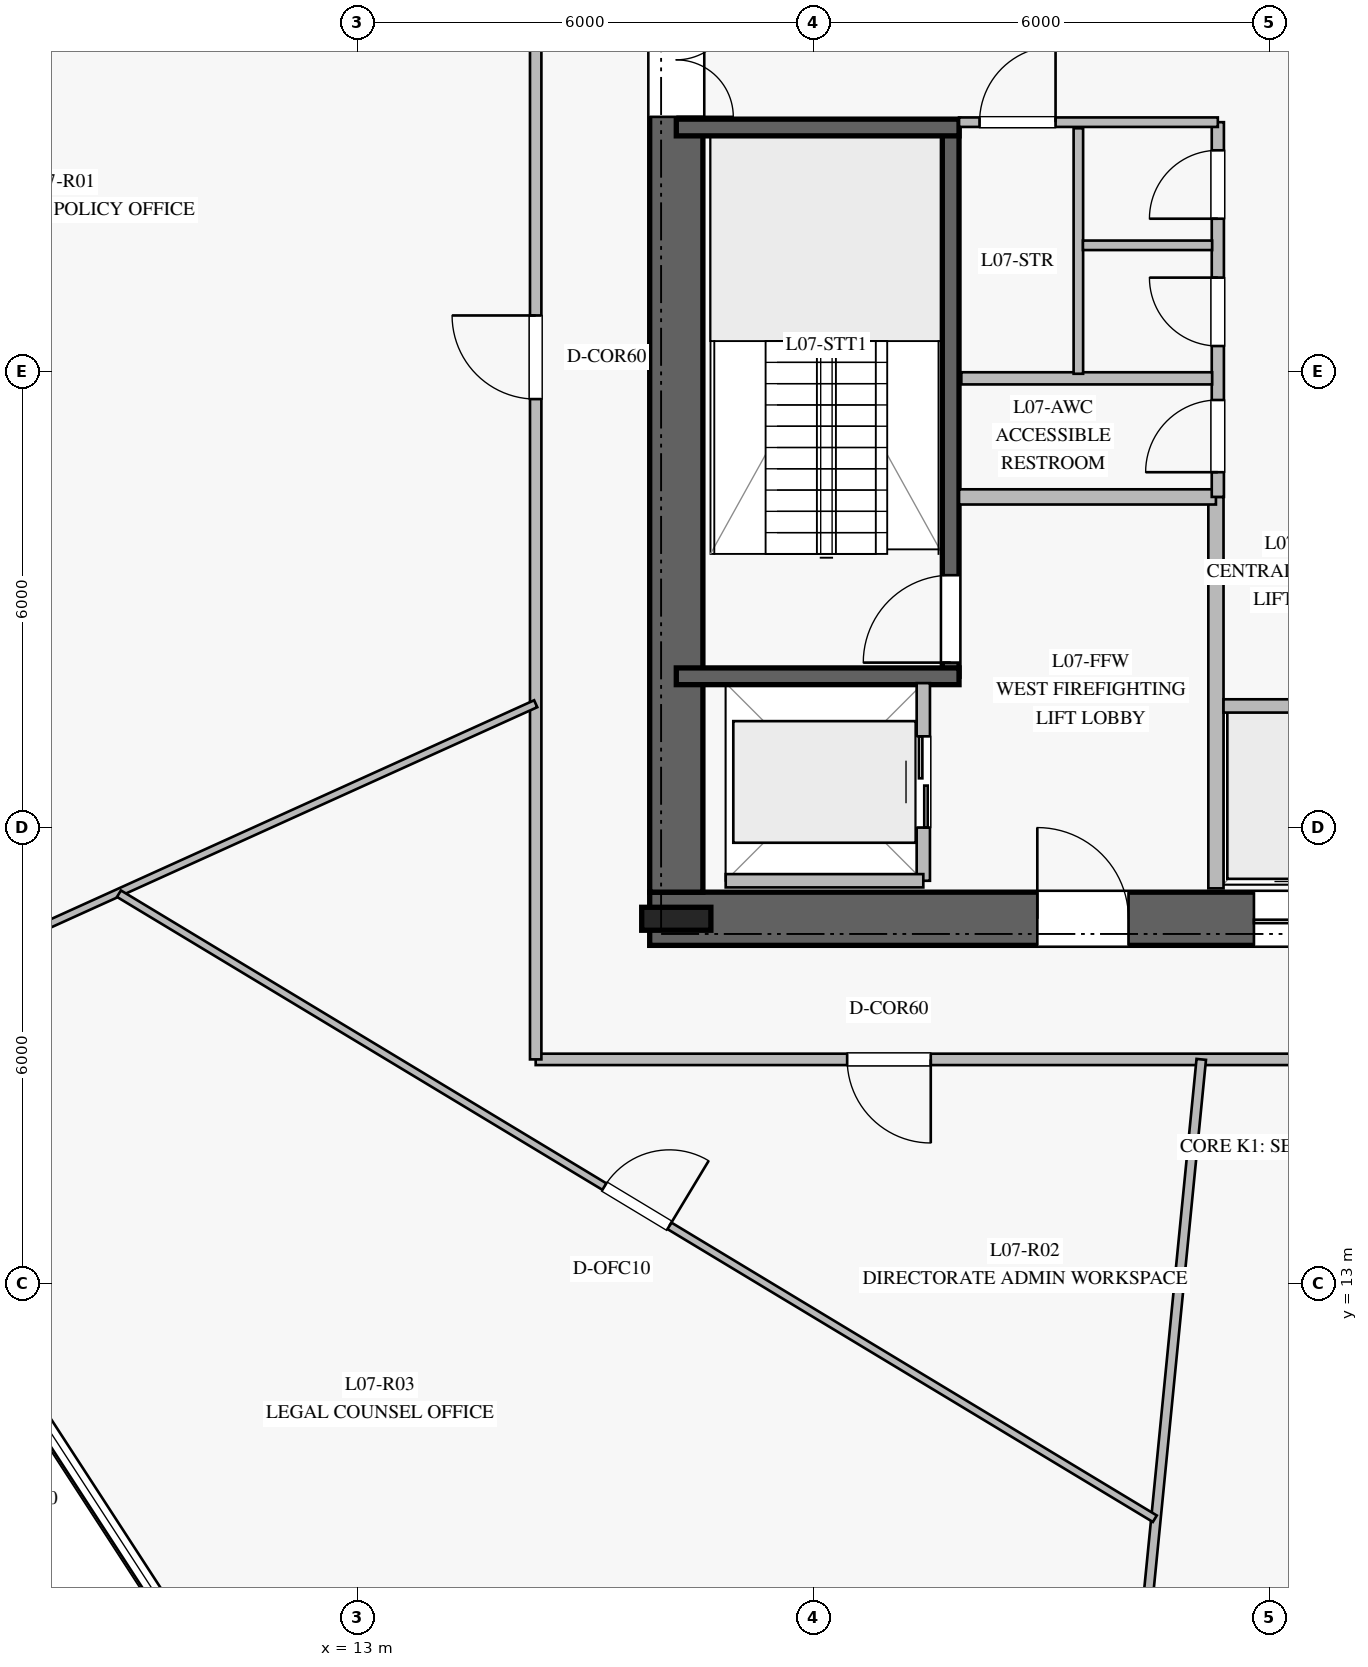
"""IFC4 building model, lengths in metres.
Left out: names, types, materials, properties, quantities, classifications, styles, units other than length and angle.
Written with IfcOpenShell. Run it as: python <this file> out.ifc"""

import sys

from ifc_helpers import new_model, si_unit, direction, frame, frame_2d, origin, origin_2d, place, context, subcontext, project, spatial, rectangle, i_section, extrude, element, fill, save


model = new_model("IFC4")
c1 = context("Model", 3, precision=1e-05, world=origin(), true_north=direction((0.0, 1.0)))
c2 = subcontext(c1, "Body", "Model", "MODEL_VIEW")
j1 = project(units=[si_unit("LENGTHUNIT", "METRE"), si_unit("PLANEANGLEUNIT", "RADIAN")], contexts=[c1])
p1 = place(None, origin())
s1 = spatial("IfcSite", under=j1, at=p1, CompositionType="ELEMENT")
p2 = place(p1, origin())
s2 = spatial("IfcBuilding", under=s1, at=p2, CompositionType="ELEMENT")
p3 = place(p2, frame((0.0, 0.0, 32.0)))
s3 = spatial("IfcBuildingStorey", under=s2, at=p3, CompositionType="ELEMENT", Elevation=32.0)
p4 = place(p3, frame((16.85, 17.8, 0.0), z_axis=(0.0, 0.0, 1.0), x_axis=(1.0, 0.0, 0.0)))
e1 = element("IfcWall", 1, at=p4, inside=s3, PredefinedType="SHEAR", context=c2, shape_type="SweptSolid", body=[
    extrude(rectangle(XDim=16.3, YDim=0.7, at=frame_2d((8.15, 0.0))), origin(), (0.0, 0.0, 1.0), 3.76),
])
p5 = place(p4, frame((5.1, 0.0, 0.0)))
e2 = element("IfcOpeningElement", 2, at=p5, cuts=e1, PredefinedType="OPENING", context=c2, shape_type="SweptSolid", body=[
    extrude(rectangle(XDim=1.2, YDim=2.25, at=frame_2d((0.6, 1.125))), frame((0.0, 0.36, 0.0), z_axis=(0.0, -1.0, 0.0), x_axis=(1.0, 0.0, 0.0)), (0.0, 0.0, 1.0), 0.72),
])
p6 = place(p4, frame((14.05, 0.0, 0.0)))
e3 = element("IfcOpeningElement", 3, at=p6, cuts=e1, PredefinedType="OPENING", context=c2, shape_type="SweptSolid", body=[
    extrude(rectangle(XDim=0.9, YDim=2.1, at=frame_2d((0.45, 1.05))), frame((0.0, 0.36, 0.0), z_axis=(0.0, -1.0, 0.0), x_axis=(1.0, 0.0, 0.0)), (0.0, 0.0, 1.0), 0.72),
])
p7 = place(p4, frame((7.95, 0.0, 0.0)))
e4 = element("IfcOpeningElement", 4, at=p7, cuts=e1, PredefinedType="OPENING", context=c2, shape_type="SweptSolid", body=[
    extrude(rectangle(XDim=1.1, YDim=2.2, at=frame_2d((0.55, 1.1))), frame((0.0, 0.36, 0.0), z_axis=(0.0, -1.0, 0.0), x_axis=(1.0, 0.0, 0.0)), (0.0, 0.0, 1.0), 0.72),
])
p8 = place(p4, frame((9.925, 0.0, 0.0)))
e5 = element("IfcOpeningElement", 5, at=p8, cuts=e1, PredefinedType="OPENING", context=c2, shape_type="SweptSolid", body=[
    extrude(rectangle(XDim=1.1, YDim=2.2, at=frame_2d((0.55, 1.1))), frame((0.0, 0.36, 0.0), z_axis=(0.0, -1.0, 0.0), x_axis=(1.0, 0.0, 0.0)), (0.0, 0.0, 1.0), 0.72),
])
p9 = place(p4, frame((11.9, 0.0, 0.0)))
e6 = element("IfcOpeningElement", 6, at=p9, cuts=e1, PredefinedType="OPENING", context=c2, shape_type="SweptSolid", body=[
    extrude(rectangle(XDim=1.1, YDim=2.2, at=frame_2d((0.55, 1.1))), frame((0.0, 0.36, 0.0), z_axis=(0.0, -1.0, 0.0), x_axis=(1.0, 0.0, 0.0)), (0.0, 0.0, 1.0), 0.72),
])
p10 = place(p3, frame((17.2, 31.85, 0.0), z_axis=(0.0, 0.0, 1.0), x_axis=(0.0, -1.0, 0.0)))
e7 = element("IfcWall", 7, at=p10, inside=s3, PredefinedType="SHEAR", context=c2, shape_type="SweptSolid", body=[
    extrude(rectangle(XDim=13.7, YDim=0.7, at=frame_2d((6.85, 0.0))), origin(), (0.0, 0.0, 1.0), 3.76),
])
p11 = place(p10, frame((2.0, 0.0, 0.0)))
e8 = element("IfcOpeningElement", 8, at=p11, cuts=e7, PredefinedType="OPENING", context=c2, shape_type="SweptSolid", body=[
    extrude(rectangle(XDim=1.5, YDim=2.2, at=frame_2d((0.75, 1.1))), frame((0.0, 0.36, 0.0), z_axis=(0.0, -1.0, 0.0), x_axis=(1.0, 0.0, 0.0)), (0.0, 0.0, 1.0), 0.72),
])
p12 = place(p3, frame((17.2, 17.8, 0.0), z_axis=(0.0, 0.0, 1.0), x_axis=(1.0, 0.0, 0.0)))
e9 = element("IfcColumn", 9, at=p12, inside=s3, PredefinedType="COLUMN", context=c2, shape_type="SweptSolid", body=[
    extrude(i_section(OverallWidth=0.302, OverallDepth=0.91, WebThickness=0.021, FlangeThickness=0.04, at=origin_2d()), origin(), (0.0, 0.0, 1.0), 4.0),
])
p13 = place(p3, frame((20.81, 20.99, 0.0), z_axis=(0.0, 0.0, 1.0), x_axis=(0.0, 1.0, 0.0)))
e10 = element("IfcWall", 10, at=p13, inside=s3, PredefinedType="SOLIDWALL", context=c2, shape_type="SweptSolid", body=[
    extrude(rectangle(XDim=7.22, YDim=0.22, at=frame_2d((3.61, 0.0))), origin(), (0.0, 0.0, 1.0), 3.76),
])
p14 = place(p13, frame((0.18, 0.0, 0.0)))
e11 = element("IfcOpeningElement", 11, at=p14, cuts=e10, PredefinedType="OPENING", context=c2, shape_type="SweptSolid", body=[
    extrude(rectangle(XDim=1.15, YDim=2.2, at=frame_2d((0.575, 1.1))), frame((0.0, 0.12, 0.0), z_axis=(0.0, -1.0, 0.0), x_axis=(1.0, 0.0, 0.0)), (0.0, 0.0, 1.0), 0.24),
])
for number, where, z_axis, x_axis in (
    (12, (17.2, 20.99, 0.0), (0.0, 0.0, 1.0), (1.0, 0.0, 0.0)),
    (13, (17.2, 28.21, 0.0), (0.0, 0.0, 1.0), (1.0, 0.0, 0.0)),
):
    element("IfcWall", number, at=place(p3, frame(where, z_axis=z_axis, x_axis=x_axis)), inside=s3, PredefinedType="SOLIDWALL", context=c2, shape_type="SweptSolid", body=[
        extrude(rectangle(XDim=3.72, YDim=0.22, at=frame_2d((1.86, 0.0))), origin(), (0.0, 0.0, 1.0), 3.76),
    ])
p15 = place(p3, frame((24.3, 18.2, 0.0), z_axis=(0.0, 0.0, 1.0), x_axis=(0.0, 1.0, 0.0)))
e14 = element("IfcWall", 14, at=p15, inside=s3, PredefinedType="PARTITIONING", context=c2, shape_type="SweptSolid", body=[
    extrude(rectangle(XDim=5.15, YDim=0.2, at=frame_2d((2.575, 0.0))), origin(), (0.0, 0.0, 1.0), 3.76),
])
p16 = place(p3, frame((20.92, 23.35, 0.0), z_axis=(0.0, 0.0, 1.0), x_axis=(1.0, 0.0, 0.0)))
e15 = element("IfcWall", 15, at=p16, inside=s3, PredefinedType="PARTITIONING", context=c2, shape_type="SweptSolid", body=[
    extrude(rectangle(XDim=3.38, YDim=0.2, at=frame_2d((1.69, 0.0))), origin(), (0.0, 0.0, 1.0), 3.76),
])
p17 = place(p3, frame((24.325, 23.35, 0.0), z_axis=(0.0, 0.0, 1.0), x_axis=(0.0, 1.0, 0.0)))
e16 = element("IfcWall", 16, at=p17, inside=s3, PredefinedType="PLUMBINGWALL", context=c2, shape_type="SweptSolid", body=[
    extrude(rectangle(XDim=4.93, YDim=0.16, at=frame_2d((2.465, 0.0))), origin(), (0.0, 0.0, 1.0), 3.76),
])
p18 = place(p17, frame((0.325, 0.0, 0.0)))
e17 = element("IfcOpeningElement", 17, at=p18, cuts=e16, PredefinedType="OPENING", context=c2, shape_type="SweptSolid", body=[
    extrude(rectangle(XDim=0.95, YDim=2.1, at=frame_2d((0.475, 1.05))), frame((0.0, 0.09, 0.0), z_axis=(0.0, -1.0, 0.0), x_axis=(1.0, 0.0, 0.0)), (0.0, 0.0, 1.0), 0.18),
])
p19 = place(p17, frame((1.985, 0.0, 0.0)))
e18 = element("IfcOpeningElement", 18, at=p19, cuts=e16, PredefinedType="OPENING", context=c2, shape_type="SweptSolid", body=[
    extrude(rectangle(XDim=0.9, YDim=2.1, at=frame_2d((0.45, 1.05))), frame((0.0, 0.09, 0.0), z_axis=(0.0, -1.0, 0.0), x_axis=(1.0, 0.0, 0.0)), (0.0, 0.0, 1.0), 0.18),
])
p20 = place(p17, frame((3.66, 0.0, 0.0)))
e19 = element("IfcOpeningElement", 19, at=p20, cuts=e16, PredefinedType="OPENING", context=c2, shape_type="SweptSolid", body=[
    extrude(rectangle(XDim=0.9, YDim=2.1, at=frame_2d((0.45, 1.05))), frame((0.0, 0.09, 0.0), z_axis=(0.0, -1.0, 0.0), x_axis=(1.0, 0.0, 0.0)), (0.0, 0.0, 1.0), 0.18),
])
p21 = place(p3, frame((20.92, 28.28, 0.0), z_axis=(0.0, 0.0, 1.0), x_axis=(1.0, 0.0, 0.0)))
e20 = element("IfcWall", 20, at=p21, inside=s3, PredefinedType="PARTITIONING", context=c2, shape_type="SweptSolid", body=[
    extrude(rectangle(XDim=3.405, YDim=0.125, at=frame_2d((1.703, 0.0))), origin(), (0.0, 0.0, 1.0), 3.76),
])
p22 = place(p21, frame((0.27, 0.0, 0.0)))
e21 = element("IfcOpeningElement", 21, at=p22, cuts=e20, PredefinedType="OPENING", context=c2, shape_type="SweptSolid", body=[
    extrude(rectangle(XDim=1.0, YDim=2.15, at=frame_2d((0.5, 1.075))), frame((0.0, 0.073, 0.0), z_axis=(0.0, -1.0, 0.0), x_axis=(1.0, 0.0, 0.0)), (0.0, 0.0, 1.0), 0.145),
])
p23 = place(p3, frame((20.95, 24.91, 0.0), z_axis=(0.0, 0.0, 1.0), x_axis=(1.0, 0.0, 0.0)))
e22 = element("IfcWall", 22, at=p23, inside=s3, PredefinedType="PLUMBINGWALL", context=c2, shape_type="SweptSolid", body=[
    extrude(rectangle(XDim=3.3, YDim=0.16, at=frame_2d((1.65, 0.0))), origin(), (0.0, 0.0, 1.0), 3.76),
])
p24 = place(p3, frame((22.49, 24.97, 0.0), z_axis=(0.0, 0.0, 1.0), x_axis=(0.0, 1.0, 0.0)))
e23 = element("IfcWall", 23, at=p24, inside=s3, PredefinedType="PARTITIONING", context=c2, shape_type="SweptSolid", body=[
    extrude(rectangle(XDim=3.23, YDim=0.125, at=frame_2d((1.615, 0.0))), origin(), (0.0, 0.0, 1.0), 3.76),
])
p25 = place(p3, frame((22.55, 26.66, 0.0), z_axis=(0.0, 0.0, 1.0), x_axis=(1.0, 0.0, 0.0)))
e24 = element("IfcWall", 24, at=p25, inside=s3, PredefinedType="PARTITIONING", context=c2, shape_type="SweptSolid", body=[
    extrude(rectangle(XDim=1.7, YDim=0.125, at=frame_2d((0.85, 0.0))), origin(), (0.0, 0.0, 1.0), 3.76),
])
p26 = place(p3, frame((24.4, 20.6, 0.0), z_axis=(0.0, 0.0, 1.0), x_axis=(1.0, 0.0, 0.0)))
e25 = element("IfcWall", 25, at=p26, inside=s3, PredefinedType="PARTITIONING", context=c2, shape_type="SweptSolid", body=[
    extrude(rectangle(XDim=1.9, YDim=0.175, at=frame_2d((0.95, 0.0))), origin(), (0.0, 0.0, 1.0), 3.76),
])
p27 = place(p3, frame((20.45, 18.3, 0.0), z_axis=(0.0, 0.0, 1.0), x_axis=(0.0, 1.0, 0.0)))
e26 = element("IfcWall", 26, at=p27, inside=s3, PredefinedType="PARTITIONING", context=c2, shape_type="SweptSolid", body=[
    extrude(rectangle(XDim=2.6, YDim=0.175, at=frame_2d((1.3, 0.0))), origin(), (0.0, 0.0, 1.0), 3.76),
])
p28 = place(p27, frame((0.7, 0.0, 0.0)))
e27 = element("IfcOpeningElement", 27, at=p28, cuts=e26, PredefinedType="OPENING", context=c2, shape_type="SweptSolid", body=[
    extrude(rectangle(XDim=1.2, YDim=2.2, at=frame_2d((0.6, 1.1))), frame((0.0, 0.098, 0.0), z_axis=(0.0, -1.0, 0.0), x_axis=(1.0, 0.0, 0.0)), (0.0, 0.0, 1.0), 0.195),
])
p29 = place(p3, frame((17.85, 18.3, 0.0), z_axis=(0.0, 0.0, 1.0), x_axis=(1.0, 0.0, 0.0)))
e28 = element("IfcWall", 28, at=p29, inside=s3, PredefinedType="PARTITIONING", context=c2, shape_type="SweptSolid", body=[
    extrude(rectangle(XDim=2.6, YDim=0.175, at=frame_2d((1.3, 0.0))), origin(), (0.0, 0.0, 1.0), 3.76),
])
p30 = place(p3, frame((34.65, 15.95, 0.0), z_axis=(0.0, 0.0, 1.0), x_axis=(-1.0, 0.0, 0.0)))
e29 = element("IfcWall", 29, at=p30, inside=s3, PredefinedType="PARTITIONING", context=c2, shape_type="SweptSolid", body=[
    extrude(rectangle(XDim=19.3, YDim=0.15, at=frame_2d((9.65, 0.0))), origin(), (0.0, 0.0, 1.0), 3.21),
])
p31 = place(p30, frame((14.102, 0.0, 0.0)))
e30 = element("IfcOpeningElement", 30, at=p31, cuts=e29, PredefinedType="OPENING", context=c2, shape_type="SweptSolid", body=[
    extrude(rectangle(XDim=1.1, YDim=2.2, at=frame_2d((0.55, 1.1))), frame((0.0, 0.085, 0.0), z_axis=(0.0, -1.0, 0.0), x_axis=(1.0, 0.0, 0.0)), (0.0, 0.0, 1.0), 0.17),
])
p32 = place(p30, frame((4.818, 0.0, 0.0)))
e31 = element("IfcOpeningElement", 31, at=p32, cuts=e29, PredefinedType="OPENING", context=c2, shape_type="SweptSolid", body=[
    extrude(rectangle(XDim=1.1, YDim=2.2, at=frame_2d((0.55, 1.1))), frame((0.0, 0.085, 0.0), z_axis=(0.0, -1.0, 0.0), x_axis=(1.0, 0.0, 0.0)), (0.0, 0.0, 1.0), 0.17),
])
p33 = place(p3, frame((15.35, 15.95, 0.0), z_axis=(0.0, 0.0, 1.0), x_axis=(0.0, 1.0, 0.0)))
e32 = element("IfcWall", 32, at=p33, inside=s3, PredefinedType="PARTITIONING", context=c2, shape_type="SweptSolid", body=[
    extrude(rectangle(XDim=18.1, YDim=0.15, at=frame_2d((9.05, 0.0))), origin(), (0.0, 0.0, 1.0), 3.21),
])
p34 = place(p33, frame((8.687, 0.0, 0.0)))
e33 = element("IfcOpeningElement", 33, at=p34, cuts=e32, PredefinedType="OPENING", context=c2, shape_type="SweptSolid", body=[
    extrude(rectangle(XDim=1.1, YDim=2.2, at=frame_2d((0.55, 1.1))), frame((0.0, 0.085, 0.0), z_axis=(0.0, -1.0, 0.0), x_axis=(1.0, 0.0, 0.0)), (0.0, 0.0, 1.0), 0.17),
])
p35 = place(p3, frame((15.35, 20.629, 0.0), z_axis=(0.0, 0.0, 1.0), x_axis=(-0.910935697365, -0.412548367184, 0.0)))
e34 = element("IfcWall", 34, at=p35, inside=s3, PredefinedType="MOVABLE", context=c2, shape_type="SweptSolid", body=[
    extrude(rectangle(XDim=10.677, YDim=0.1, at=frame_2d((5.338, 0.0))), origin(), (0.0, 0.0, 1.0), 3.05),
])
p36 = place(p3, frame((24.107, 15.95, 0.0), z_axis=(0.0, 0.0, 1.0), x_axis=(-0.098223238164, -0.995164406259, 0.0)))
e35 = element("IfcWall", 35, at=p36, inside=s3, PredefinedType="PARTITIONING", context=c2, shape_type="SweptSolid", body=[
    extrude(rectangle(XDim=12.177, YDim=0.125, at=frame_2d((6.088, 0.0))), origin(), (0.0, 0.0, 1.0), 3.06),
])
p37 = place(p3, frame((9.867, 18.13, 0.0), z_axis=(0.0, 0.0, 1.0), x_axis=(0.856231759505, -0.516591883419, 0.0)))
e36 = element("IfcWall", 36, at=p37, inside=s3, PredefinedType="MOVABLE", context=c2, shape_type="SweptSolid", body=[
    extrude(rectangle(XDim=15.917, YDim=0.1, at=frame_2d((7.959, 0.0))), origin(), (0.0, 0.0, 1.0), 3.05),
])
p38 = place(p37, frame((7.459, 0.0, 0.0)))
e37 = element("IfcOpeningElement", 37, at=p38, cuts=e36, PredefinedType="OPENING", context=c2, shape_type="SweptSolid", body=[
    extrude(rectangle(XDim=1.0, YDim=2.15, at=frame_2d((0.5, 1.075))), frame((0.0, 0.06, 0.0), z_axis=(0.0, -1.0, 0.0), x_axis=(1.0, 0.0, 0.0)), (0.0, 0.0, 1.0), 0.12),
])
p39 = place(p14, origin())
e38 = element("IfcDoor", 38, at=p39, inside=s3, OperationType="SINGLE_SWING_LEFT", PredefinedType="DOOR", context=c2, shape_type="SweptSolid", body=[
    extrude(rectangle(XDim=1.15, YDim=2.2, at=frame_2d((0.575, 1.1))), frame((0.0, 0.025, 0.0), z_axis=(0.0, -1.0, 0.0), x_axis=(1.0, 0.0, 0.0)), (0.0, 0.0, 1.0), 0.05),
])
fill(e11, e38)
p40 = place(p5, origin())
e39 = element("IfcDoor", 39, at=p40, inside=s3, OperationType="SINGLE_SWING_LEFT", PredefinedType="DOOR", context=c2, shape_type="SweptSolid", body=[
    extrude(rectangle(XDim=1.2, YDim=2.25, at=frame_2d((0.6, 1.125))), frame((0.0, 0.025, 0.0), z_axis=(0.0, -1.0, 0.0), x_axis=(1.0, 0.0, 0.0)), (0.0, 0.0, 1.0), 0.05),
])
fill(e2, e39)
p41 = place(p11, origin())
e40 = element("IfcDoor", 40, at=p41, inside=s3, OperationType="DOUBLE_DOOR_SINGLE_SWING", PredefinedType="DOOR", context=c2, shape_type="SweptSolid", body=[
    extrude(rectangle(XDim=1.5, YDim=2.2, at=frame_2d((0.75, 1.1))), frame((0.0, 0.025, 0.0), z_axis=(0.0, -1.0, 0.0), x_axis=(1.0, 0.0, 0.0)), (0.0, 0.0, 1.0), 0.05),
])
fill(e8, e40)
p42 = place(p18, origin())
e41 = element("IfcDoor", 41, at=p42, inside=s3, OperationType="SINGLE_SWING_LEFT", PredefinedType="DOOR", context=c2, shape_type="SweptSolid", body=[
    extrude(rectangle(XDim=0.95, YDim=2.1, at=frame_2d((0.475, 1.05))), frame((0.0, 0.025, 0.0), z_axis=(0.0, -1.0, 0.0), x_axis=(1.0, 0.0, 0.0)), (0.0, 0.0, 1.0), 0.05),
])
fill(e17, e41)
p43 = place(p19, origin())
e42 = element("IfcDoor", 42, at=p43, inside=s3, OperationType="SINGLE_SWING_RIGHT", PredefinedType="DOOR", context=c2, shape_type="SweptSolid", body=[
    extrude(rectangle(XDim=0.9, YDim=2.1, at=frame_2d((0.45, 1.05))), frame((0.0, 0.025, 0.0), z_axis=(0.0, -1.0, 0.0), x_axis=(1.0, 0.0, 0.0)), (0.0, 0.0, 1.0), 0.05),
])
fill(e18, e42)
p44 = place(p20, origin())
e43 = element("IfcDoor", 43, at=p44, inside=s3, OperationType="SINGLE_SWING_LEFT", PredefinedType="DOOR", context=c2, shape_type="SweptSolid", body=[
    extrude(rectangle(XDim=0.9, YDim=2.1, at=frame_2d((0.45, 1.05))), frame((0.0, 0.025, 0.0), z_axis=(0.0, -1.0, 0.0), x_axis=(1.0, 0.0, 0.0)), (0.0, 0.0, 1.0), 0.05),
])
fill(e19, e43)
p45 = place(p22, origin())
e44 = element("IfcDoor", 44, at=p45, inside=s3, OperationType="SINGLE_SWING_RIGHT", PredefinedType="DOOR", context=c2, shape_type="SweptSolid", body=[
    extrude(rectangle(XDim=1.0, YDim=2.15, at=frame_2d((0.5, 1.075))), frame((0.0, 0.025, 0.0), z_axis=(0.0, -1.0, 0.0), x_axis=(1.0, 0.0, 0.0)), (0.0, 0.0, 1.0), 0.05),
])
fill(e21, e44)
p46 = place(p7, origin())
e45 = element("IfcDoor", 45, at=p46, inside=s3, OperationType="DOUBLE_DOOR_SLIDING", PredefinedType="DOOR", context=c2, shape_type="SweptSolid", body=[
    extrude(rectangle(XDim=1.1, YDim=2.2, at=frame_2d((0.55, 1.1))), frame((0.0, 0.025, 0.0), z_axis=(0.0, -1.0, 0.0), x_axis=(1.0, 0.0, 0.0)), (0.0, 0.0, 1.0), 0.05),
])
fill(e4, e45)
p47 = place(p28, origin())
e46 = element("IfcDoor", 46, at=p47, inside=s3, OperationType="DOUBLE_DOOR_SLIDING", PredefinedType="DOOR", context=c2, shape_type="SweptSolid", body=[
    extrude(rectangle(XDim=1.2, YDim=2.2, at=frame_2d((0.6, 1.1))), frame((0.0, 0.025, 0.0), z_axis=(0.0, -1.0, 0.0), x_axis=(1.0, 0.0, 0.0)), (0.0, 0.0, 1.0), 0.05),
])
fill(e27, e46)
p48 = place(p34, origin())
e47 = element("IfcDoor", 47, at=p48, inside=s3, OperationType="SINGLE_SWING_RIGHT", PredefinedType="DOOR", context=c2, shape_type="SweptSolid", body=[
    extrude(rectangle(XDim=1.1, YDim=2.2, at=frame_2d((0.55, 1.1))), frame((0.0, 0.025, 0.0), z_axis=(0.0, -1.0, 0.0), x_axis=(1.0, 0.0, 0.0)), (0.0, 0.0, 1.0), 0.05),
])
fill(e33, e47)
p49 = place(p31, origin())
e48 = element("IfcDoor", 48, at=p49, inside=s3, OperationType="SINGLE_SWING_LEFT", PredefinedType="DOOR", context=c2, shape_type="SweptSolid", body=[
    extrude(rectangle(XDim=1.1, YDim=2.2, at=frame_2d((0.55, 1.1))), frame((0.0, 0.025, 0.0), z_axis=(0.0, -1.0, 0.0), x_axis=(1.0, 0.0, 0.0)), (0.0, 0.0, 1.0), 0.05),
])
fill(e30, e48)
p50 = place(p38, origin())
e49 = element("IfcDoor", 49, at=p50, inside=s3, OperationType="SINGLE_SWING_RIGHT", PredefinedType="DOOR", context=c2, shape_type="SweptSolid", body=[
    extrude(rectangle(XDim=1.0, YDim=2.15, at=frame_2d((0.5, 1.075))), frame((0.0, 0.025, 0.0), z_axis=(0.0, -1.0, 0.0), x_axis=(1.0, 0.0, 0.0)), (0.0, 0.0, 1.0), 0.05),
])
fill(e37, e49)
save(model, sys.argv[1])
